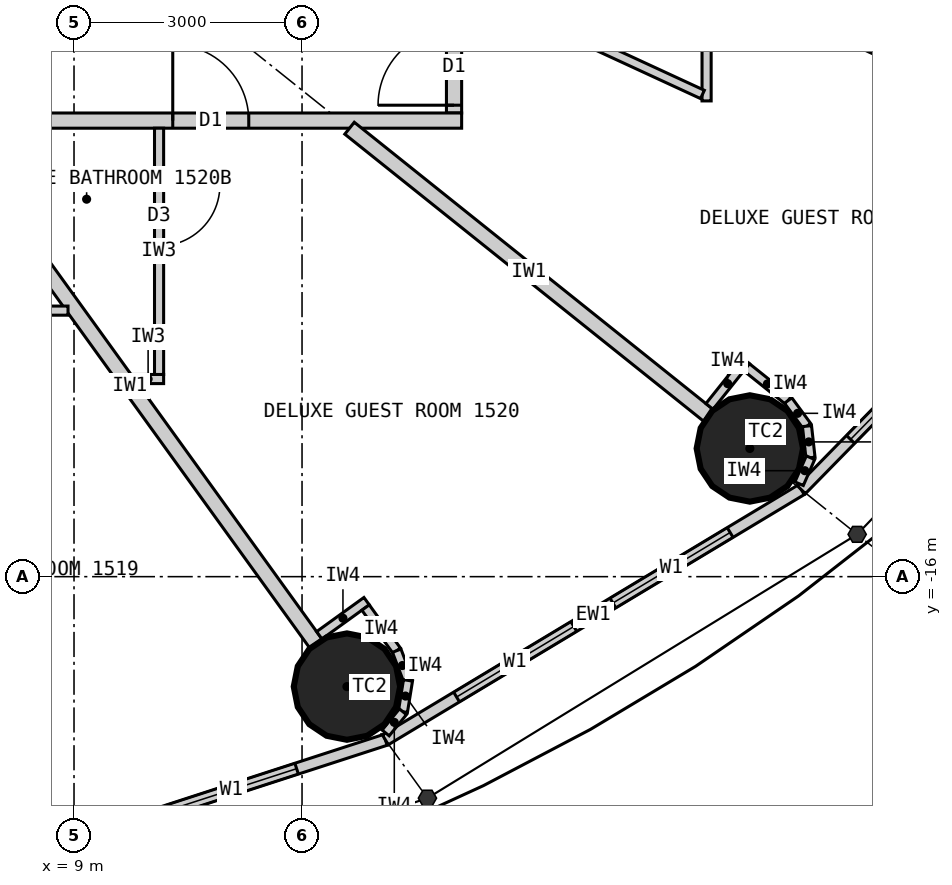
"""IFC4 building model, lengths in metres.
Left out: names, types, materials, properties, quantities, classifications, styles, units other than length and angle.
Written with IfcOpenShell. Run it as: python <this file> out.ifc"""

import sys

from ifc_helpers import new_model, si_unit, direction, frame, frame_2d, origin, origin_2d, place, context, subcontext, project, spatial, rectangle, circle, extrude, element, fill, save


model = new_model("IFC4")
c1 = context("Model", 3, precision=1e-05, world=origin(), true_north=direction((0.0, 1.0)))
c2 = subcontext(c1, "Body", "Model", "MODEL_VIEW")
j1 = project(units=[si_unit("LENGTHUNIT", "METRE"), si_unit("PLANEANGLEUNIT", "RADIAN")], contexts=[c1])
p1 = place(None, origin())
s1 = spatial("IfcSite", under=j1, at=p1, CompositionType="ELEMENT")
p2 = place(p1, origin())
s2 = spatial("IfcBuilding", under=s1, at=p2, CompositionType="ELEMENT")
p3 = place(p2, frame((0.0, 0.0, 63.9)))
s3 = spatial("IfcBuildingStorey", under=s2, at=p3, CompositionType="ELEMENT", Elevation=63.9)
for number, where, z_axis, x_axis in (
    (1, (12.591, -17.447, 0.0), (0.0, 0.0, 1.0), (1.0, 0.0, 0.0)),
    (2, (17.892, -14.313, 0.0), (0.0, 0.0, 1.0), (1.0, 0.0, 0.0)),
):
    element("IfcColumn", number, at=place(p3, frame(where, z_axis=z_axis, x_axis=x_axis)), inside=s3, PredefinedType="COLUMN", context=c2, shape_type="SweptSolid", body=[
        extrude(circle(Radius=0.7, at=origin_2d()), origin(), (0.0, 0.0, 1.0), 3.3),
    ])
p4 = place(p3, frame((6.766, -20.202, 0.0), z_axis=(0.0, 0.0, 1.0), x_axis=(0.951137534625, 0.308767534285, 0.0)))
e3 = element("IfcWall", 3, at=p4, inside=s3, PredefinedType="ELEMENTEDWALL", context=c2, shape_type="SweptSolid", body=[
    extrude(rectangle(XDim=6.655, YDim=0.15, at=frame_2d((3.328, 0.0))), origin(), (0.0, 0.0, 1.0), 3.12),
])
p5 = place(p4, frame((1.228, 0.0, 0.9)))
e4 = element("IfcOpeningElement", 4, at=p5, cuts=e3, PredefinedType="OPENING", context=c2, shape_type="SweptSolid", body=[
    extrude(rectangle(XDim=1.8, YDim=1.9, at=frame_2d((0.9, 0.95))), frame((0.0, 0.085, 0.0), z_axis=(0.0, -1.0, 0.0), x_axis=(1.0, 0.0, 0.0)), (0.0, 0.0, 1.0), 0.17),
])
p6 = place(p4, frame((3.628, 0.0, 0.9)))
e5 = element("IfcOpeningElement", 5, at=p6, cuts=e3, PredefinedType="OPENING", context=c2, shape_type="SweptSolid", body=[
    extrude(rectangle(XDim=1.8, YDim=1.9, at=frame_2d((0.9, 0.95))), frame((0.0, 0.085, 0.0), z_axis=(0.0, -1.0, 0.0), x_axis=(1.0, 0.0, 0.0)), (0.0, 0.0, 1.0), 0.17),
])
p7 = place(p3, frame((13.096, -18.147, 0.0), z_axis=(0.0, 0.0, 1.0), x_axis=(0.856983180864, 0.515344377787, 0.0)))
e6 = element("IfcWall", 6, at=p7, inside=s3, PredefinedType="ELEMENTEDWALL", context=c2, shape_type="SweptSolid", body=[
    extrude(rectangle(XDim=6.386, YDim=0.15, at=frame_2d((3.193, 0.0))), origin(), (0.0, 0.0, 1.0), 3.12),
])
p8 = place(p7, frame((1.093, 0.0, 0.9)))
e7 = element("IfcOpeningElement", 7, at=p8, cuts=e6, PredefinedType="OPENING", context=c2, shape_type="SweptSolid", body=[
    extrude(rectangle(XDim=1.8, YDim=1.9, at=frame_2d((0.9, 0.95))), frame((0.0, 0.085, 0.0), z_axis=(0.0, -1.0, 0.0), x_axis=(1.0, 0.0, 0.0)), (0.0, 0.0, 1.0), 0.17),
])
p9 = place(p7, frame((3.493, 0.0, 0.9)))
e8 = element("IfcOpeningElement", 8, at=p9, cuts=e6, PredefinedType="OPENING", context=c2, shape_type="SweptSolid", body=[
    extrude(rectangle(XDim=1.8, YDim=1.9, at=frame_2d((0.9, 0.95))), frame((0.0, 0.085, 0.0), z_axis=(0.0, -1.0, 0.0), x_axis=(1.0, 0.0, 0.0)), (0.0, 0.0, 1.0), 0.17),
])
p10 = place(p3, frame((18.57, -14.856, 0.0), z_axis=(0.0, 0.0, 1.0), x_axis=(0.699602905915, 0.714531856557, 0.0)))
e9 = element("IfcWall", 9, at=p10, inside=s3, PredefinedType="ELEMENTEDWALL", context=c2, shape_type="SweptSolid", body=[
    extrude(rectangle(XDim=6.051, YDim=0.15, at=frame_2d((3.025, 0.0))), origin(), (0.0, 0.0, 1.0), 3.12),
])
p11 = place(p10, frame((0.926, 0.0, 0.9)))
e10 = element("IfcOpeningElement", 10, at=p11, cuts=e9, PredefinedType="OPENING", context=c2, shape_type="SweptSolid", body=[
    extrude(rectangle(XDim=1.8, YDim=1.9, at=frame_2d((0.9, 0.95))), frame((0.0, 0.085, 0.0), z_axis=(0.0, -1.0, 0.0), x_axis=(1.0, 0.0, 0.0)), (0.0, 0.0, 1.0), 0.17),
])
p12 = place(p10, frame((3.325, 0.0, 0.9)))
e11 = element("IfcOpeningElement", 11, at=p12, cuts=e9, PredefinedType="OPENING", context=c2, shape_type="SweptSolid", body=[
    extrude(rectangle(XDim=1.8, YDim=1.9, at=frame_2d((0.9, 0.95))), frame((0.0, 0.085, 0.0), z_axis=(0.0, -1.0, 0.0), x_axis=(1.0, 0.0, 0.0)), (0.0, 0.0, 1.0), 0.17),
])
p13 = place(p3, frame((14.0, -9.9, 0.0), z_axis=(0.0, 0.0, 1.0), x_axis=(0.0, 1.0, 0.0)))
e12 = element("IfcWall", 12, at=p13, inside=s3, PredefinedType="PARTITIONING", context=c2, shape_type="SweptSolid", body=[
    extrude(rectangle(XDim=19.8, YDim=0.2, at=frame_2d((9.9, 0.0))), origin(), (0.0, 0.0, 1.0), 3.12),
])
p14 = place(p13, frame((0.103, 0.0, 0.0)))
e13 = element("IfcOpeningElement", 13, at=p14, cuts=e12, PredefinedType="OPENING", context=c2, shape_type="SweptSolid", body=[
    extrude(rectangle(XDim=1.0, YDim=2.2, at=frame_2d((0.5, 1.1))), frame((0.0, 0.11, 0.0), z_axis=(0.0, -1.0, 0.0), x_axis=(1.0, 0.0, 0.0)), (0.0, 0.0, 1.0), 0.22),
])
p15 = place(p13, frame((5.248, 0.0, 0.0)))
e14 = element("IfcOpeningElement", 14, at=p15, cuts=e12, PredefinedType="OPENING", context=c2, shape_type="SweptSolid", body=[
    extrude(rectangle(XDim=1.0, YDim=2.2, at=frame_2d((0.5, 1.1))), frame((0.0, 0.11, 0.0), z_axis=(0.0, -1.0, 0.0), x_axis=(1.0, 0.0, 0.0)), (0.0, 0.0, 1.0), 0.22),
])
p16 = place(p13, frame((8.438, 0.0, 0.0)))
e15 = element("IfcOpeningElement", 15, at=p16, cuts=e12, PredefinedType="OPENING", context=c2, shape_type="SweptSolid", body=[
    extrude(rectangle(XDim=1.0, YDim=2.2, at=frame_2d((0.5, 1.1))), frame((0.0, 0.11, 0.0), z_axis=(0.0, -1.0, 0.0), x_axis=(1.0, 0.0, 0.0)), (0.0, 0.0, 1.0), 0.22),
])
p17 = place(p13, frame((14.532, 0.0, 0.0)))
e16 = element("IfcOpeningElement", 16, at=p17, cuts=e12, PredefinedType="OPENING", context=c2, shape_type="SweptSolid", body=[
    extrude(rectangle(XDim=1.0, YDim=2.2, at=frame_2d((0.5, 1.1))), frame((0.0, 0.11, 0.0), z_axis=(0.0, -1.0, 0.0), x_axis=(1.0, 0.0, 0.0)), (0.0, 0.0, 1.0), 0.22),
])
p18 = place(p3, frame((14.1, -10.0, 0.0), z_axis=(0.0, 0.0, 1.0), x_axis=(-1.0, 0.0, 0.0)))
e17 = element("IfcWall", 17, at=p18, inside=s3, PredefinedType="PARTITIONING", context=c2, shape_type="SweptSolid", body=[
    extrude(rectangle(XDim=28.2, YDim=0.2, at=frame_2d((14.1, 0.0))), origin(), (0.0, 0.0, 1.0), 3.12),
])
p19 = place(p18, frame((23.865, 0.0, 0.0)))
e18 = element("IfcOpeningElement", 18, at=p19, cuts=e17, PredefinedType="OPENING", context=c2, shape_type="SweptSolid", body=[
    extrude(rectangle(XDim=1.0, YDim=2.2, at=frame_2d((0.5, 1.1))), frame((0.0, 0.11, 0.0), z_axis=(0.0, -1.0, 0.0), x_axis=(1.0, 0.0, 0.0)), (0.0, 0.0, 1.0), 0.22),
])
p20 = place(p18, frame((18.529, 0.0, 0.0)))
e19 = element("IfcOpeningElement", 19, at=p20, cuts=e17, PredefinedType="OPENING", context=c2, shape_type="SweptSolid", body=[
    extrude(rectangle(XDim=1.0, YDim=2.2, at=frame_2d((0.5, 1.1))), frame((0.0, 0.11, 0.0), z_axis=(0.0, -1.0, 0.0), x_axis=(1.0, 0.0, 0.0)), (0.0, 0.0, 1.0), 0.22),
])
p21 = place(p18, frame((14.623, 0.0, 0.0)))
e20 = element("IfcOpeningElement", 20, at=p21, cuts=e17, PredefinedType="OPENING", context=c2, shape_type="SweptSolid", body=[
    extrude(rectangle(XDim=1.0, YDim=2.2, at=frame_2d((0.5, 1.1))), frame((0.0, 0.11, 0.0), z_axis=(0.0, -1.0, 0.0), x_axis=(1.0, 0.0, 0.0)), (0.0, 0.0, 1.0), 0.22),
])
p22 = place(p18, frame((11.24, 0.0, 0.0)))
e21 = element("IfcOpeningElement", 21, at=p22, cuts=e17, PredefinedType="OPENING", context=c2, shape_type="SweptSolid", body=[
    extrude(rectangle(XDim=1.0, YDim=2.2, at=frame_2d((0.5, 1.1))), frame((0.0, 0.11, 0.0), z_axis=(0.0, -1.0, 0.0), x_axis=(1.0, 0.0, 0.0)), (0.0, 0.0, 1.0), 0.22),
])
p23 = place(p18, frame((8.671, 0.0, 0.0)))
e22 = element("IfcOpeningElement", 22, at=p23, cuts=e17, PredefinedType="OPENING", context=c2, shape_type="SweptSolid", body=[
    extrude(rectangle(XDim=1.0, YDim=2.2, at=frame_2d((0.5, 1.1))), frame((0.0, 0.11, 0.0), z_axis=(0.0, -1.0, 0.0), x_axis=(1.0, 0.0, 0.0)), (0.0, 0.0, 1.0), 0.22),
])
p24 = place(p18, frame((2.801, 0.0, 0.0)))
e23 = element("IfcOpeningElement", 23, at=p24, cuts=e17, PredefinedType="OPENING", context=c2, shape_type="SweptSolid", body=[
    extrude(rectangle(XDim=1.0, YDim=2.2, at=frame_2d((0.5, 1.1))), frame((0.0, 0.11, 0.0), z_axis=(0.0, -1.0, 0.0), x_axis=(1.0, 0.0, 0.0)), (0.0, 0.0, 1.0), 0.22),
])
p25 = place(p3, frame((7.289, -10.1, 0.0), z_axis=(0.0, 0.0, 1.0), x_axis=(0.585198353053, -0.810890182197, 0.0)))
e24 = element("IfcWall", 24, at=p25, inside=s3, PredefinedType="PARTITIONING", context=c2, shape_type="SweptSolid", body=[
    extrude(rectangle(XDim=8.36, YDim=0.2, at=frame_2d((4.18, 0.0))), origin(), (0.0, 0.0, 1.0), 2.32),
])
p26 = place(p3, frame((12.625, -10.1, 0.0), z_axis=(0.0, 0.0, 1.0), x_axis=(0.780892451574, -0.624665493744, 0.0)))
e25 = element("IfcWall", 25, at=p26, inside=s3, PredefinedType="PARTITIONING", context=c2, shape_type="SweptSolid", body=[
    extrude(rectangle(XDim=6.045, YDim=0.2, at=frame_2d((3.022, 0.0))), origin(), (0.0, 0.0, 1.0), 2.32),
])
p27 = place(p3, frame((14.1, -6.512, 0.0), z_axis=(0.0, 0.0, 1.0), x_axis=(0.907832871056, -0.419332181247, 0.0)))
e26 = element("IfcWall", 26, at=p27, inside=s3, PredefinedType="PARTITIONING", context=c2, shape_type="SweptSolid", body=[
    extrude(rectangle(XDim=8.023, YDim=0.2, at=frame_2d((4.011, 0.0))), origin(), (0.0, 0.0, 1.0), 2.32),
])
p28 = place(p3, frame((17.323, -8.101, 0.0), z_axis=(0.0, 0.0, 1.0), x_axis=(0.0, -1.0, 0.0)))
e27 = element("IfcWall", 27, at=p28, inside=s3, PredefinedType="PARTITIONING", context=c2, shape_type="SweptSolid", body=[
    extrude(rectangle(XDim=1.64, YDim=0.12, at=frame_2d((0.82, 0.0))), origin(), (0.0, 0.0, 1.0), 3.12),
])
p29 = place(p3, frame((14.1, -8.193, 0.0), z_axis=(0.0, 0.0, 1.0), x_axis=(0.907836493557, -0.419324338628, 0.0)))
e28 = element("IfcWall", 28, at=p29, inside=s3, PredefinedType="PARTITIONING", context=c2, shape_type="SweptSolid", body=[
    extrude(rectangle(XDim=3.49, YDim=0.12, at=frame_2d((1.745, 0.0))), origin(), (0.0, 0.0, 1.0), 3.12),
])
p30 = place(p29, frame((0.75, 0.0, 0.0)))
e29 = element("IfcOpeningElement", 29, at=p30, cuts=e28, PredefinedType="OPENING", context=c2, shape_type="SweptSolid", body=[
    extrude(rectangle(XDim=0.8, YDim=2.1, at=frame_2d((0.4, 1.05))), frame((0.0, 0.07, 0.0), z_axis=(0.0, -1.0, 0.0), x_axis=(1.0, 0.0, 0.0)), (0.0, 0.0, 1.0), 0.14),
])
p31 = place(p3, frame((8.921, -12.5, 0.0), z_axis=(0.0, 0.0, 1.0), x_axis=(-1.0, 0.0, 0.0)))
e30 = element("IfcWall", 30, at=p31, inside=s3, PredefinedType="PARTITIONING", context=c2, shape_type="SweptSolid", body=[
    extrude(rectangle(XDim=3.372, YDim=0.12, at=frame_2d((1.686, 0.0))), origin(), (0.0, 0.0, 1.0), 3.12),
])
p32 = place(p3, frame((9.771, -13.4, 0.0), z_axis=(0.0, 0.0, 1.0), x_axis=(1.0, 0.0, 0.0)))
e31 = element("IfcWall", 31, at=p32, inside=s3, PredefinedType="PARTITIONING", context=c2, shape_type="SweptSolid", body=[
    extrude(rectangle(XDim=0.408, YDim=0.12, at=frame_2d((0.204, 0.0))), origin(), (0.0, 0.0, 1.0), 3.12),
])
p33 = place(p3, frame((10.119, -10.1, 0.0), z_axis=(0.0, 0.0, 1.0), x_axis=(0.0, -1.0, 0.0)))
e32 = element("IfcWall", 32, at=p33, inside=s3, PredefinedType="PARTITIONING", context=c2, shape_type="SweptSolid", body=[
    extrude(rectangle(XDim=3.24, YDim=0.12, at=frame_2d((1.62, 0.0))), origin(), (0.0, 0.0, 1.0), 3.12),
])
p34 = place(p33, frame((0.75, 0.0, 0.0)))
e33 = element("IfcOpeningElement", 33, at=p34, cuts=e32, PredefinedType="OPENING", context=c2, shape_type="SweptSolid", body=[
    extrude(rectangle(XDim=0.8, YDim=2.1, at=frame_2d((0.4, 1.05))), frame((0.0, 0.07, 0.0), z_axis=(0.0, -1.0, 0.0), x_axis=(1.0, 0.0, 0.0)), (0.0, 0.0, 1.0), 0.14),
])
p35 = place(p3, frame((12.227, -16.772, 0.0), z_axis=(0.0, 0.0, 1.0), x_axis=(0.810821798253, 0.585293098778, 0.0)))
e34 = element("IfcWall", 34, at=p35, inside=s3, PredefinedType="PARTITIONING", context=c2, shape_type="SweptSolid", body=[
    extrude(rectangle(XDim=0.768, YDim=0.12, at=frame_2d((0.384, 0.0))), origin(), (0.0, 0.0, 1.0), 3.12),
])
p36 = place(p3, frame((12.836, -16.406, 0.0), z_axis=(0.0, 0.0, 1.0), x_axis=(0.585223113993, -0.810872312296, 0.0)))
e35 = element("IfcWall", 35, at=p36, inside=s3, PredefinedType="PARTITIONING", context=c2, shape_type="SweptSolid", body=[
    extrude(rectangle(XDim=0.7, YDim=0.12, at=frame_2d((0.35, 0.0))), origin(), (0.0, 0.0, 1.0), 3.12),
])
p37 = place(p3, frame((13.246, -16.974, 0.0), z_axis=(0.0, 0.0, 1.0), x_axis=(0.355728122235, -0.934589483705, 0.0)))
e36 = element("IfcWall", 36, at=p37, inside=s3, PredefinedType="PARTITIONING", context=c2, shape_type="SweptSolid", body=[
    extrude(rectangle(XDim=0.418, YDim=0.12, at=frame_2d((0.209, 0.0))), origin(), (0.0, 0.0, 1.0), 3.12),
])
p38 = place(p3, frame((13.394, -17.365, 0.0), z_axis=(0.0, 0.0, 1.0), x_axis=(-0.159379276926, -0.987217425943, 0.0)))
e37 = element("IfcWall", 37, at=p38, inside=s3, PredefinedType="PARTITIONING", context=c2, shape_type="SweptSolid", body=[
    extrude(rectangle(XDim=0.418, YDim=0.12, at=frame_2d((0.209, 0.0))), origin(), (0.0, 0.0, 1.0), 3.12),
])
p39 = place(p3, frame((13.328, -17.777, 0.0), z_axis=(0.0, 0.0, 1.0), x_axis=(-0.632276783541, -0.774742582407, 0.0)))
e38 = element("IfcWall", 38, at=p39, inside=s3, PredefinedType="PARTITIONING", context=c2, shape_type="SweptSolid", body=[
    extrude(rectangle(XDim=0.36, YDim=0.12, at=frame_2d((0.18, 0.0))), origin(), (0.0, 0.0, 1.0), 3.12),
])
p40 = place(p3, frame((17.361, -13.76, 0.0), z_axis=(0.0, 0.0, 1.0), x_axis=(0.624501042889, 0.781023973659, 0.0)))
e39 = element("IfcWall", 39, at=p40, inside=s3, PredefinedType="PARTITIONING", context=c2, shape_type="SweptSolid", body=[
    extrude(rectangle(XDim=0.767, YDim=0.12, at=frame_2d((0.384, 0.0))), origin(), (0.0, 0.0, 1.0), 3.12),
])
p41 = place(p3, frame((17.85, -13.246, 0.0), z_axis=(0.0, 0.0, 1.0), x_axis=(0.780902834923, -0.62465251333, 0.0)))
e40 = element("IfcWall", 40, at=p41, inside=s3, PredefinedType="PARTITIONING", context=c2, shape_type="SweptSolid", body=[
    extrude(rectangle(XDim=0.7, YDim=0.12, at=frame_2d((0.35, 0.0))), origin(), (0.0, 0.0, 1.0), 3.12),
])
for number, where, z_axis, x_axis in (
    (41, (18.396, -13.683, 0.0), (0.0, 0.0, 1.0), (0.592, -0.806, 0.0)),
    (42, (18.644, -14.02, 0.0), (0.0, 0.0, 1.0), (0.11, -0.994, 0.0)),
):
    element("IfcWall", number, at=place(p3, frame(where, z_axis=z_axis, x_axis=x_axis)), inside=s3, PredefinedType="PARTITIONING", context=c2, shape_type="SweptSolid", body=[
        extrude(rectangle(XDim=0.418, YDim=0.12, at=frame_2d((0.209, 0.0))), origin(), (0.0, 0.0, 1.0), 3.12),
    ])
p42 = place(p3, frame((18.69, -14.435, 0.0), z_axis=(0.0, 0.0, 1.0), x_axis=(-0.401093412634, -0.91603715773, 0.0)))
e43 = element("IfcWall", 43, at=p42, inside=s3, PredefinedType="PARTITIONING", context=c2, shape_type="SweptSolid", body=[
    extrude(rectangle(XDim=0.373, YDim=0.12, at=frame_2d((0.187, 0.0))), origin(), (0.0, 0.0, 1.0), 3.12),
])
p43 = place(p6, origin())
e44 = element("IfcWindow", 44, at=p43, inside=s3, PartitioningType="SINGLE_PANEL", PredefinedType="WINDOW", context=c2, shape_type="SweptSolid", body=[
    extrude(rectangle(XDim=1.8, YDim=1.9, at=frame_2d((0.9, 0.95))), frame((0.0, 0.03, 0.0), z_axis=(0.0, -1.0, 0.0), x_axis=(1.0, 0.0, 0.0)), (0.0, 0.0, 1.0), 0.06),
])
fill(e5, e44)
p44 = place(p8, origin())
e45 = element("IfcWindow", 45, at=p44, inside=s3, PartitioningType="SINGLE_PANEL", PredefinedType="WINDOW", context=c2, shape_type="SweptSolid", body=[
    extrude(rectangle(XDim=1.8, YDim=1.9, at=frame_2d((0.9, 0.95))), frame((0.0, 0.03, 0.0), z_axis=(0.0, -1.0, 0.0), x_axis=(1.0, 0.0, 0.0)), (0.0, 0.0, 1.0), 0.06),
])
fill(e7, e45)
p45 = place(p9, origin())
e46 = element("IfcWindow", 46, at=p45, inside=s3, PartitioningType="SINGLE_PANEL", PredefinedType="WINDOW", context=c2, shape_type="SweptSolid", body=[
    extrude(rectangle(XDim=1.8, YDim=1.9, at=frame_2d((0.9, 0.95))), frame((0.0, 0.03, 0.0), z_axis=(0.0, -1.0, 0.0), x_axis=(1.0, 0.0, 0.0)), (0.0, 0.0, 1.0), 0.06),
])
fill(e8, e46)
p46 = place(p11, origin())
e47 = element("IfcWindow", 47, at=p46, inside=s3, PartitioningType="SINGLE_PANEL", PredefinedType="WINDOW", context=c2, shape_type="SweptSolid", body=[
    extrude(rectangle(XDim=1.8, YDim=1.9, at=frame_2d((0.9, 0.95))), frame((0.0, 0.03, 0.0), z_axis=(0.0, -1.0, 0.0), x_axis=(1.0, 0.0, 0.0)), (0.0, 0.0, 1.0), 0.06),
])
fill(e10, e47)
p47 = place(p14, origin())
e48 = element("IfcDoor", 48, at=p47, inside=s3, OperationType="SINGLE_SWING_LEFT", PredefinedType="DOOR", context=c2, shape_type="SweptSolid", body=[
    extrude(rectangle(XDim=1.0, YDim=2.2, at=frame_2d((0.5, 1.1))), frame((0.0, 0.025, 0.0), z_axis=(0.0, -1.0, 0.0), x_axis=(1.0, 0.0, 0.0)), (0.0, 0.0, 1.0), 0.05),
])
fill(e13, e48)
p48 = place(p34, origin())
e49 = element("IfcDoor", 49, at=p48, inside=s3, OperationType="SINGLE_SWING_LEFT", PredefinedType="DOOR", context=c2, shape_type="SweptSolid", body=[
    extrude(rectangle(XDim=0.8, YDim=2.1, at=frame_2d((0.4, 1.05))), frame((0.0, 0.025, 0.0), z_axis=(0.0, -1.0, 0.0), x_axis=(1.0, 0.0, 0.0)), (0.0, 0.0, 1.0), 0.05),
])
fill(e33, e49)
p49 = place(p24, origin())
e50 = element("IfcDoor", 50, at=p49, inside=s3, OperationType="SINGLE_SWING_RIGHT", PredefinedType="DOOR", context=c2, shape_type="SweptSolid", body=[
    extrude(rectangle(XDim=1.0, YDim=2.2, at=frame_2d((0.5, 1.1))), frame((0.0, 0.025, 0.0), z_axis=(0.0, -1.0, 0.0), x_axis=(1.0, 0.0, 0.0)), (0.0, 0.0, 1.0), 0.05),
])
fill(e23, e50)
save(model, sys.argv[1])
